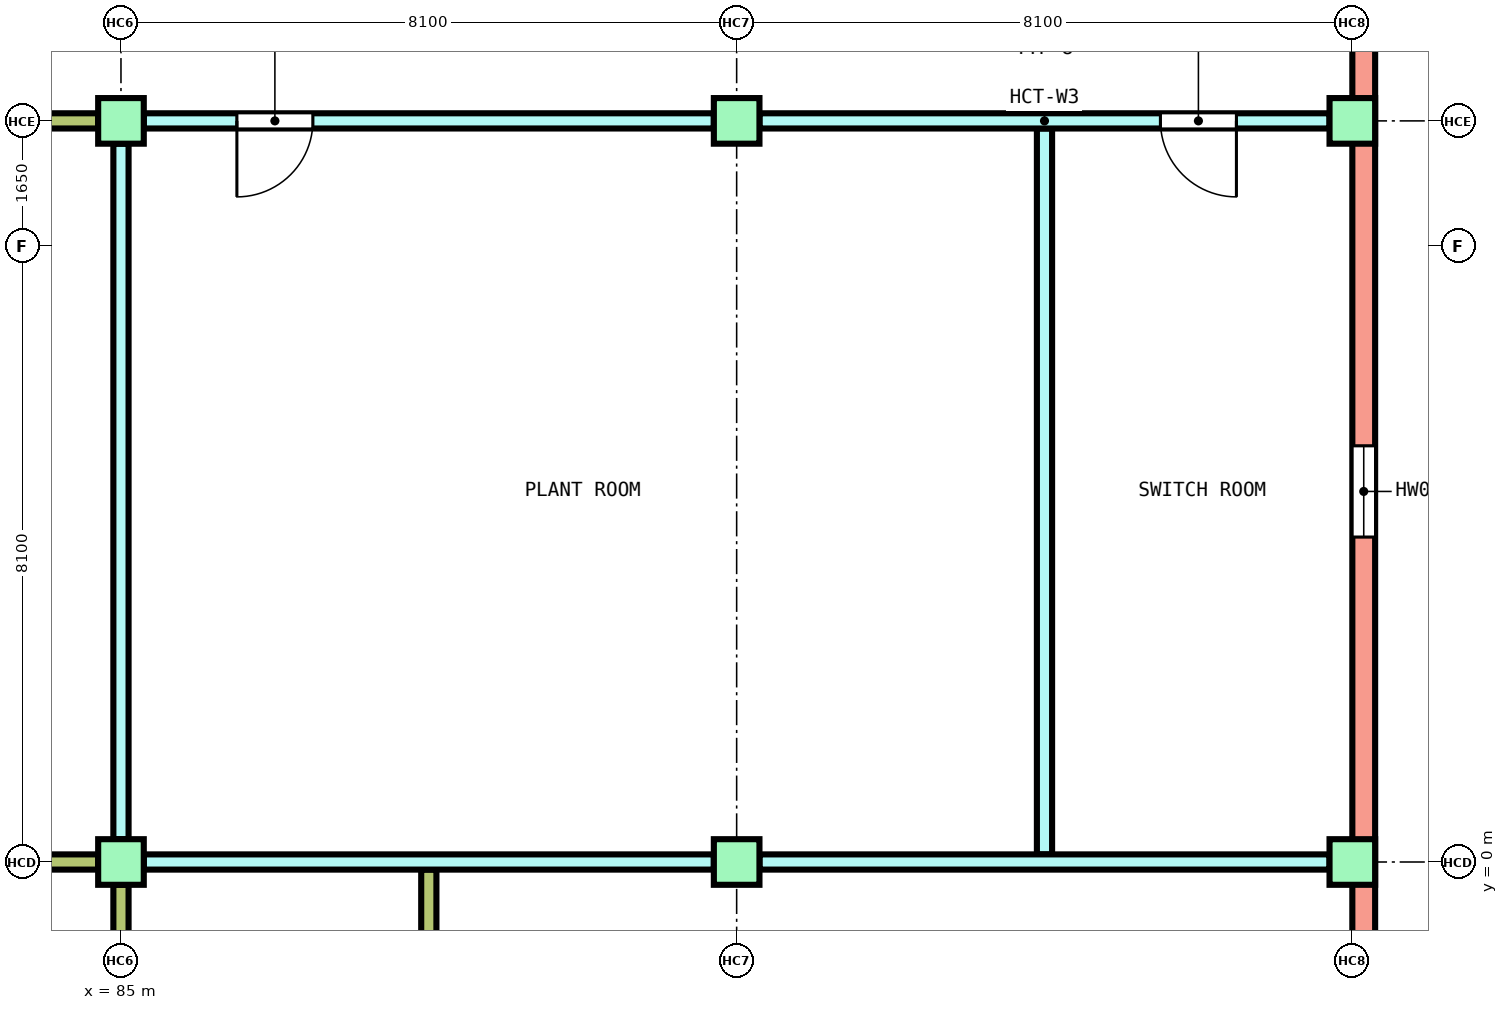
"""IFC4 building model, lengths in metres.
Left out: names, types, materials, properties, quantities, classifications, styles, units other than length and angle.
Written with IfcOpenShell. Run it as: python <this file> out.ifc"""

import sys

from ifc_helpers import new_model, si_unit, direction, frame, frame_2d, origin, origin_2d, place, context, subcontext, project, spatial, rectangle, extrude, element, fill, save


model = new_model("IFC4")
c1 = context("Model", 3, precision=1e-05, world=origin(), true_north=direction((0.0, 1.0)))
c2 = subcontext(c1, "Body", "Model", "MODEL_VIEW")
j1 = project(units=[si_unit("LENGTHUNIT", "METRE"), si_unit("PLANEANGLEUNIT", "RADIAN")], contexts=[c1])
p1 = place(None, origin())
s1 = spatial("IfcSite", under=j1, at=p1, CompositionType="ELEMENT")
p2 = place(p1, origin())
s2 = spatial("IfcBuilding", under=s1, at=p2, CompositionType="ELEMENT")
p3 = place(p2, origin())
s3 = spatial("IfcBuildingStorey", under=s2, at=p3, CompositionType="ELEMENT", Elevation=0.0)
for number, where, z_axis, x_axis in (
    (1, (85.0, 0.0, -0.25), (0.0, 0.0, 1.0), (1.0, 0.0, 0.0)),
    (2, (93.1, 0.0, -0.25), (0.0, 0.0, 1.0), (1.0, 0.0, 0.0)),
    (3, (101.2, 0.0, -0.25), (0.0, 0.0, 1.0), (1.0, 0.0, 0.0)),
    (4, (85.0, 9.75, -0.25), (0.0, 0.0, 1.0), (1.0, 0.0, 0.0)),
    (5, (93.1, 9.75, -0.25), (0.0, 0.0, 1.0), (1.0, 0.0, 0.0)),
    (6, (101.2, 9.75, -0.25), (0.0, 0.0, 1.0), (1.0, 0.0, 0.0)),
):
    element("IfcColumn", number, at=place(p3, frame(where, z_axis=z_axis, x_axis=x_axis)), inside=s3, PredefinedType="COLUMN", context=c2, shape_type="SweptSolid", body=[
        extrude(rectangle(XDim=0.6, YDim=0.6, at=origin_2d()), origin(), (0.0, 0.0, 1.0), 5.85),
    ])
p4 = place(p3, frame((85.0, -9.45, 0.0), z_axis=(0.0, 0.0, 1.0), x_axis=(0.0, 1.0, 0.0)))
e7 = element("IfcWall", 7, at=p4, inside=s3, PredefinedType="PARTITIONING", context=c2, shape_type="SweptSolid", body=[
    extrude(rectangle(XDim=9.15, YDim=0.2, at=frame_2d((4.575, 0.0))), origin(), (0.0, 0.0, 1.0), 4.8),
])
p5 = place(p3, frame((85.0, 0.3, 0.0), z_axis=(0.0, 0.0, 1.0), x_axis=(0.0, 1.0, 0.0)))
e8 = element("IfcWall", 8, at=p5, inside=s3, PredefinedType="SOLIDWALL", context=c2, shape_type="SweptSolid", body=[
    extrude(rectangle(XDim=9.15, YDim=0.2, at=frame_2d((4.575, 0.0))), origin(), (0.0, 0.0, 1.0), 4.8),
])
p6 = place(p3, frame((89.05, -9.65, 0.0), z_axis=(0.0, 0.0, 1.0), x_axis=(0.0, 1.0, 0.0)))
e9 = element("IfcWall", 9, at=p6, inside=s3, PredefinedType="PARTITIONING", context=c2, shape_type="SweptSolid", body=[
    extrude(rectangle(XDim=9.55, YDim=0.2, at=frame_2d((4.775, 0.0))), origin(), (0.0, 0.0, 1.0), 4.8),
])
p7 = place(p3, frame((97.15, 0.1, 0.0), z_axis=(0.0, 0.0, 1.0), x_axis=(0.0, 1.0, 0.0)))
e10 = element("IfcWall", 10, at=p7, inside=s3, PredefinedType="SOLIDWALL", context=c2, shape_type="SweptSolid", body=[
    extrude(rectangle(XDim=9.55, YDim=0.2, at=frame_2d((4.775, 0.0))), origin(), (0.0, 0.0, 1.0), 4.8),
])
p8 = place(p3, frame((101.35, 20.25, 0.0), z_axis=(0.0, 0.0, 1.0), x_axis=(0.0, -1.0, 0.0)))
e11 = element("IfcWall", 11, at=p8, inside=s3, PredefinedType="SOLIDWALL", context=c2, shape_type="SweptSolid", body=[
    extrude(rectangle(XDim=40.5, YDim=0.3, at=frame_2d((20.25, 0.0))), origin(), (0.0, 0.0, 1.0), 4.8),
])
p9 = place(p8, frame((5.73, 0.0, 0.0)))
e12 = element("IfcOpeningElement", 12, at=p9, cuts=e11, PredefinedType="OPENING", context=c2, shape_type="SweptSolid", body=[
    extrude(rectangle(XDim=1.2, YDim=2.1, at=frame_2d((0.6, 1.05))), frame((0.0, 0.16, 0.0), z_axis=(0.0, -1.0, 0.0), x_axis=(1.0, 0.0, 0.0)), (0.0, 0.0, 1.0), 0.32),
])
p10 = place(p8, frame((23.625, 0.0, 0.0)))
e13 = element("IfcOpeningElement", 13, at=p10, cuts=e11, PredefinedType="OPENING", context=c2, shape_type="SweptSolid", body=[
    extrude(rectangle(XDim=3.0, YDim=3.0, at=frame_2d((1.5, 1.5))), frame((0.0, 0.16, 0.0), z_axis=(0.0, -1.0, 0.0), x_axis=(1.0, 0.0, 0.0)), (0.0, 0.0, 1.0), 0.32),
])
p11 = place(p8, frame((36.15, 0.0, 1.5)))
e14 = element("IfcOpeningElement", 14, at=p11, cuts=e11, PredefinedType="OPENING", context=c2, shape_type="SweptSolid", body=[
    extrude(rectangle(XDim=1.2, YDim=0.9, at=frame_2d((0.6, 0.45))), frame((0.0, 0.16, 0.0), z_axis=(0.0, -1.0, 0.0), x_axis=(1.0, 0.0, 0.0)), (0.0, 0.0, 1.0), 0.32),
])
p12 = place(p8, frame((14.775, 0.0, 1.5)))
e15 = element("IfcOpeningElement", 15, at=p12, cuts=e11, PredefinedType="OPENING", context=c2, shape_type="SweptSolid", body=[
    extrude(rectangle(XDim=1.2, YDim=0.9, at=frame_2d((0.6, 0.45))), frame((0.0, 0.16, 0.0), z_axis=(0.0, -1.0, 0.0), x_axis=(1.0, 0.0, 0.0)), (0.0, 0.0, 1.0), 0.32),
])
p13 = place(p3, frame((77.2, 0.0, 0.0), z_axis=(0.0, 0.0, 1.0), x_axis=(1.0, 0.0, 0.0)))
e16 = element("IfcWall", 16, at=p13, inside=s3, PredefinedType="PARTITIONING", context=c2, shape_type="SweptSolid", body=[
    extrude(rectangle(XDim=7.5, YDim=0.2, at=frame_2d((3.75, 0.0))), origin(), (0.0, 0.0, 1.0), 4.8),
])
for number, where, z_axis, x_axis in (
    (17, (85.3, 0.0, 0.0), (0.0, 0.0, 1.0), (1.0, 0.0, 0.0)),
    (18, (93.4, 0.0, 0.0), (0.0, 0.0, 1.0), (1.0, 0.0, 0.0)),
):
    element("IfcWall", number, at=place(p3, frame(where, z_axis=z_axis, x_axis=x_axis)), inside=s3, PredefinedType="SOLIDWALL", context=c2, shape_type="SweptSolid", body=[
        extrude(rectangle(XDim=7.5, YDim=0.2, at=frame_2d((3.75, 0.0))), origin(), (0.0, 0.0, 1.0), 4.8),
    ])
p14 = place(p3, frame((77.2, 9.75, 0.0), z_axis=(0.0, 0.0, 1.0), x_axis=(1.0, 0.0, 0.0)))
e19 = element("IfcWall", 19, at=p14, inside=s3, PredefinedType="PARTITIONING", context=c2, shape_type="SweptSolid", body=[
    extrude(rectangle(XDim=7.5, YDim=0.2, at=frame_2d((3.75, 0.0))), origin(), (0.0, 0.0, 1.0), 4.8),
])
p15 = place(p14, frame((1.225, 0.0, 0.0)))
e20 = element("IfcOpeningElement", 20, at=p15, cuts=e19, PredefinedType="OPENING", context=c2, shape_type="SweptSolid", body=[
    extrude(rectangle(XDim=1.0, YDim=2.1, at=frame_2d((0.5, 1.05))), frame((0.0, 0.11, 0.0), z_axis=(0.0, -1.0, 0.0), x_axis=(1.0, 0.0, 0.0)), (0.0, 0.0, 1.0), 0.22),
])
p16 = place(p14, frame((5.275, 0.0, 0.0)))
e21 = element("IfcOpeningElement", 21, at=p16, cuts=e19, PredefinedType="OPENING", context=c2, shape_type="SweptSolid", body=[
    extrude(rectangle(XDim=1.0, YDim=2.1, at=frame_2d((0.5, 1.05))), frame((0.0, 0.11, 0.0), z_axis=(0.0, -1.0, 0.0), x_axis=(1.0, 0.0, 0.0)), (0.0, 0.0, 1.0), 0.22),
])
p17 = place(p3, frame((85.3, 9.75, 0.0), z_axis=(0.0, 0.0, 1.0), x_axis=(1.0, 0.0, 0.0)))
e22 = element("IfcWall", 22, at=p17, inside=s3, PredefinedType="SOLIDWALL", context=c2, shape_type="SweptSolid", body=[
    extrude(rectangle(XDim=7.5, YDim=0.2, at=frame_2d((3.75, 0.0))), origin(), (0.0, 0.0, 1.0), 4.8),
])
p18 = place(p17, frame((1.225, 0.0, 0.0)))
e23 = element("IfcOpeningElement", 23, at=p18, cuts=e22, PredefinedType="OPENING", context=c2, shape_type="SweptSolid", body=[
    extrude(rectangle(XDim=1.0, YDim=2.1, at=frame_2d((0.5, 1.05))), frame((0.0, 0.11, 0.0), z_axis=(0.0, -1.0, 0.0), x_axis=(1.0, 0.0, 0.0)), (0.0, 0.0, 1.0), 0.22),
])
p19 = place(p3, frame((93.4, 9.75, 0.0), z_axis=(0.0, 0.0, 1.0), x_axis=(1.0, 0.0, 0.0)))
e24 = element("IfcWall", 24, at=p19, inside=s3, PredefinedType="SOLIDWALL", context=c2, shape_type="SweptSolid", body=[
    extrude(rectangle(XDim=7.5, YDim=0.2, at=frame_2d((3.75, 0.0))), origin(), (0.0, 0.0, 1.0), 4.8),
])
p20 = place(p19, frame((5.275, 0.0, 0.0)))
e25 = element("IfcOpeningElement", 25, at=p20, cuts=e24, PredefinedType="OPENING", context=c2, shape_type="SweptSolid", body=[
    extrude(rectangle(XDim=1.0, YDim=2.1, at=frame_2d((0.5, 1.05))), frame((0.0, 0.11, 0.0), z_axis=(0.0, -1.0, 0.0), x_axis=(1.0, 0.0, 0.0)), (0.0, 0.0, 1.0), 0.22),
])
p21 = place(p18, origin())
e26 = element("IfcDoor", 26, at=p21, inside=s3, OperationType="SINGLE_SWING_LEFT", PredefinedType="DOOR", context=c2, shape_type="SweptSolid", body=[
    extrude(rectangle(XDim=1.0, YDim=2.1, at=frame_2d((0.5, 1.05))), frame((0.0, 0.025, 0.0), z_axis=(0.0, -1.0, 0.0), x_axis=(1.0, 0.0, 0.0)), (0.0, 0.0, 1.0), 0.05),
])
fill(e23, e26)
p22 = place(p20, origin())
e27 = element("IfcDoor", 27, at=p22, inside=s3, OperationType="SINGLE_SWING_LEFT", PredefinedType="DOOR", context=c2, shape_type="SweptSolid", body=[
    extrude(rectangle(XDim=1.0, YDim=2.1, at=frame_2d((0.5, 1.05))), frame((0.0, 0.025, 0.0), z_axis=(0.0, -1.0, 0.0), x_axis=(1.0, 0.0, 0.0)), (0.0, 0.0, 1.0), 0.05),
])
fill(e25, e27)
p23 = place(p12, origin())
e28 = element("IfcWindow", 28, at=p23, inside=s3, PartitioningType="SINGLE_PANEL", PredefinedType="WINDOW", context=c2, shape_type="SweptSolid", body=[
    extrude(rectangle(XDim=1.2, YDim=0.9, at=frame_2d((0.6, 0.45))), frame((0.0, 0.03, 0.0), z_axis=(0.0, -1.0, 0.0), x_axis=(1.0, 0.0, 0.0)), (0.0, 0.0, 1.0), 0.06),
])
fill(e15, e28)
save(model, sys.argv[1])
